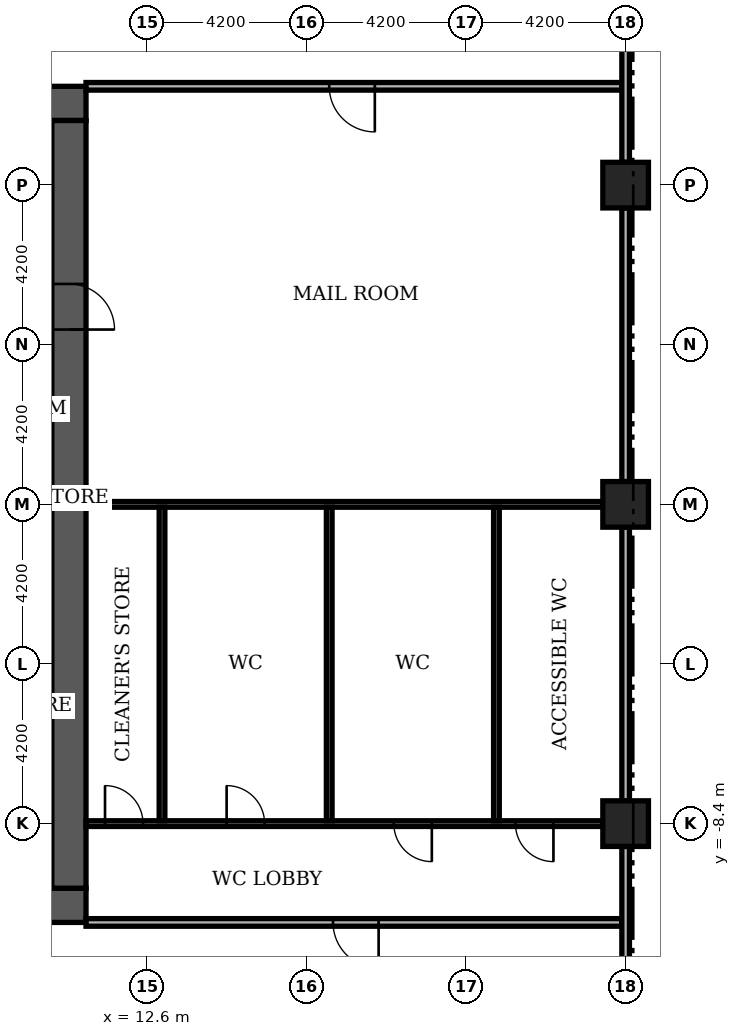
"""IFC4 building model, lengths in metres.
Left out: names, types, materials, properties, quantities, classifications, styles, units other than length and angle.
Written with IfcOpenShell. Run it as: python <this file> out.ifc"""

import sys

from ifc_helpers import new_model, si_unit, direction, frame, frame_2d, origin, origin_2d, place, context, subcontext, project, spatial, rectangle, extrude, element, fill, save


model = new_model("IFC4")
c1 = context("Model", 3, precision=1e-05, world=origin(), true_north=direction((0.0, 1.0)))
c2 = subcontext(c1, "Body", "Model", "MODEL_VIEW")
j1 = project(units=[si_unit("LENGTHUNIT", "METRE"), si_unit("PLANEANGLEUNIT", "RADIAN")], contexts=[c1])
p1 = place(None, origin())
s1 = spatial("IfcSite", under=j1, at=p1, CompositionType="ELEMENT")
p2 = place(p1, origin())
s2 = spatial("IfcBuilding", under=s1, at=p2, CompositionType="ELEMENT")
p3 = place(p2, origin())
s3 = spatial("IfcBuildingStorey", under=s2, at=p3, CompositionType="ELEMENT", Elevation=0.0)
for number, where, z_axis, x_axis in (
    (1, (9.2, -3.0, 0.0), (0.0, 0.0, 1.0), (1.0, 0.0, 0.0)),
    (2, (9.2, 2.1, 0.0), (0.0, 0.0, 1.0), (1.0, 0.0, 0.0)),
):
    element("IfcWall", number, at=place(p3, frame(where, z_axis=z_axis, x_axis=x_axis)), inside=s3, PredefinedType="SHEAR", context=c2, shape_type="SweptSolid", body=[
        extrude(rectangle(XDim=0.9, YDim=0.2, at=frame_2d((0.45, 0.0))), origin(), (0.0, 0.0, 1.0), 6.78),
    ])
p4 = place(p3, frame((-11.0, -10.55, 0.0), z_axis=(0.0, 0.0, 1.0), x_axis=(1.0, 0.0, 0.0)))
e3 = element("IfcWall", 3, at=p4, inside=s3, PredefinedType="SHEAR", context=c2, shape_type="SweptSolid", body=[
    extrude(rectangle(XDim=22.0, YDim=0.9, at=frame_2d((11.0, 0.0))), origin(), (0.0, 0.0, 1.0), 6.78),
])
p5 = place(p4, frame((7.4, 0.0, 0.0)))
e4 = element("IfcOpeningElement", 4, at=p5, cuts=e3, PredefinedType="OPENING", context=c2, shape_type="SweptSolid", body=[
    extrude(rectangle(XDim=1.8, YDim=2.2, at=frame_2d((0.9, 1.1))), frame((0.0, 0.46, 0.0), z_axis=(0.0, -1.0, 0.0), x_axis=(1.0, 0.0, 0.0)), (0.0, 0.0, 1.0), 0.92),
])
p6 = place(p3, frame((-11.0, 10.55, 0.0), z_axis=(0.0, 0.0, 1.0), x_axis=(1.0, 0.0, 0.0)))
e5 = element("IfcWall", 5, at=p6, inside=s3, PredefinedType="SHEAR", context=c2, shape_type="SweptSolid", body=[
    extrude(rectangle(XDim=22.0, YDim=0.9, at=frame_2d((11.0, 0.0))), origin(), (0.0, 0.0, 1.0), 6.78),
])
p7 = place(p6, frame((12.6, 0.0, 0.0)))
e6 = element("IfcOpeningElement", 6, at=p7, cuts=e5, PredefinedType="OPENING", context=c2, shape_type="SweptSolid", body=[
    extrude(rectangle(XDim=1.2, YDim=2.2, at=frame_2d((0.6, 1.1))), frame((0.0, 0.46, 0.0), z_axis=(0.0, -1.0, 0.0), x_axis=(1.0, 0.0, 0.0)), (0.0, 0.0, 1.0), 0.92),
])
p8 = place(p6, frame((14.8, 0.0, 0.0)))
e7 = element("IfcOpeningElement", 7, at=p8, cuts=e5, PredefinedType="OPENING", context=c2, shape_type="SweptSolid", body=[
    extrude(rectangle(XDim=1.2, YDim=2.2, at=frame_2d((0.6, 1.1))), frame((0.0, 0.46, 0.0), z_axis=(0.0, -1.0, 0.0), x_axis=(1.0, 0.0, 0.0)), (0.0, 0.0, 1.0), 0.92),
])
p9 = place(p3, frame((10.55, -10.1, 0.0), z_axis=(0.0, 0.0, 1.0), x_axis=(0.0, 1.0, 0.0)))
e8 = element("IfcWall", 8, at=p9, inside=s3, PredefinedType="SHEAR", context=c2, shape_type="SweptSolid", body=[
    extrude(rectangle(XDim=20.2, YDim=0.9, at=frame_2d((10.1, 0.0))), origin(), (0.0, 0.0, 1.0), 6.78),
])
p10 = place(p9, frame((14.7, 0.0, 0.0)))
e9 = element("IfcOpeningElement", 9, at=p10, cuts=e8, PredefinedType="OPENING", context=c2, shape_type="SweptSolid", body=[
    extrude(rectangle(XDim=1.2, YDim=2.2, at=frame_2d((0.6, 1.1))), frame((0.0, 0.46, 0.0), z_axis=(0.0, -1.0, 0.0), x_axis=(1.0, 0.0, 0.0)), (0.0, 0.0, 1.0), 0.92),
])
for number, where, z_axis, x_axis in (
    (10, (25.2, 0.0, 0.0), (0.0, 0.0, 1.0), (1.0, 0.0, 0.0)),
    (11, (25.2, 8.4, 0.0), (0.0, 0.0, 1.0), (1.0, 0.0, 0.0)),
    (12, (25.2, -8.4, 0.0), (0.0, 0.0, 1.0), (1.0, 0.0, 0.0)),
):
    element("IfcColumn", number, at=place(p3, frame(where, z_axis=z_axis, x_axis=x_axis)), inside=s3, PredefinedType="COLUMN", context=c2, shape_type="SweptSolid", body=[
        extrude(rectangle(XDim=1.2, YDim=1.2, at=origin_2d()), origin(), (0.0, 0.0, 1.0), 7.2),
    ])
p11 = place(p3, frame((11.0, -11.0, 0.0), z_axis=(0.0, 0.0, 1.0), x_axis=(1.0, 0.0, 0.0)))
e13 = element("IfcWall", 13, at=p11, inside=s3, PredefinedType="PARTITIONING", context=c2, shape_type="SweptSolid", body=[
    extrude(rectangle(XDim=14.1, YDim=0.2, at=frame_2d((7.05, 0.0))), origin(), (0.0, 0.0, 1.0), 6.78),
])
p12 = place(p11, frame((6.5, 0.0, 0.0)))
e14 = element("IfcOpeningElement", 14, at=p12, cuts=e13, PredefinedType="OPENING", context=c2, shape_type="SweptSolid", body=[
    extrude(rectangle(XDim=1.2, YDim=2.2, at=frame_2d((0.6, 1.1))), frame((0.0, 0.11, 0.0), z_axis=(0.0, -1.0, 0.0), x_axis=(1.0, 0.0, 0.0)), (0.0, 0.0, 1.0), 0.22),
])
p13 = place(p3, frame((11.0, -8.4, 0.0), z_axis=(0.0, 0.0, 1.0), x_axis=(1.0, 0.0, 0.0)))
e15 = element("IfcWall", 15, at=p13, inside=s3, PredefinedType="PARTITIONING", context=c2, shape_type="SweptSolid", body=[
    extrude(rectangle(XDim=13.6, YDim=0.15, at=frame_2d((6.8, 0.0))), origin(), (0.0, 0.0, 1.0), 6.78),
])
p14 = place(p13, frame((0.5, 0.0, 0.0)))
e16 = element("IfcOpeningElement", 16, at=p14, cuts=e15, PredefinedType="OPENING", context=c2, shape_type="SweptSolid", body=[
    extrude(rectangle(XDim=1.0, YDim=2.1, at=frame_2d((0.5, 1.05))), frame((0.0, 0.085, 0.0), z_axis=(0.0, -1.0, 0.0), x_axis=(1.0, 0.0, 0.0)), (0.0, 0.0, 1.0), 0.17),
])
p15 = place(p13, frame((3.7, 0.0, 0.0)))
e17 = element("IfcOpeningElement", 17, at=p15, cuts=e15, PredefinedType="OPENING", context=c2, shape_type="SweptSolid", body=[
    extrude(rectangle(XDim=1.0, YDim=2.1, at=frame_2d((0.5, 1.05))), frame((0.0, 0.085, 0.0), z_axis=(0.0, -1.0, 0.0), x_axis=(1.0, 0.0, 0.0)), (0.0, 0.0, 1.0), 0.17),
])
p16 = place(p13, frame((8.1, 0.0, 0.0)))
e18 = element("IfcOpeningElement", 18, at=p16, cuts=e15, PredefinedType="OPENING", context=c2, shape_type="SweptSolid", body=[
    extrude(rectangle(XDim=1.0, YDim=2.1, at=frame_2d((0.5, 1.05))), frame((0.0, 0.085, 0.0), z_axis=(0.0, -1.0, 0.0), x_axis=(1.0, 0.0, 0.0)), (0.0, 0.0, 1.0), 0.17),
])
p17 = place(p13, frame((11.3, 0.0, 0.0)))
e19 = element("IfcOpeningElement", 19, at=p17, cuts=e15, PredefinedType="OPENING", context=c2, shape_type="SweptSolid", body=[
    extrude(rectangle(XDim=1.0, YDim=2.1, at=frame_2d((0.5, 1.05))), frame((0.0, 0.085, 0.0), z_axis=(0.0, -1.0, 0.0), x_axis=(1.0, 0.0, 0.0)), (0.0, 0.0, 1.0), 0.17),
])
p18 = place(p3, frame((11.0, 0.0, 0.0), z_axis=(0.0, 0.0, 1.0), x_axis=(1.0, 0.0, 0.0)))
e20 = element("IfcWall", 20, at=p18, inside=s3, PredefinedType="PARTITIONING", context=c2, shape_type="SweptSolid", body=[
    extrude(rectangle(XDim=13.6, YDim=0.15, at=frame_2d((6.8, 0.0))), origin(), (0.0, 0.0, 1.0), 6.78),
])
p19 = place(p3, frame((11.0, 11.0, 0.0), z_axis=(0.0, 0.0, 1.0), x_axis=(1.0, 0.0, 0.0)))
e21 = element("IfcWall", 21, at=p19, inside=s3, PredefinedType="PARTITIONING", context=c2, shape_type="SweptSolid", body=[
    extrude(rectangle(XDim=14.1, YDim=0.2, at=frame_2d((7.05, 0.0))), origin(), (0.0, 0.0, 1.0), 6.78),
])
p20 = place(p19, frame((6.4, 0.0, 0.0)))
e22 = element("IfcOpeningElement", 22, at=p20, cuts=e21, PredefinedType="OPENING", context=c2, shape_type="SweptSolid", body=[
    extrude(rectangle(XDim=1.2, YDim=2.2, at=frame_2d((0.6, 1.1))), frame((0.0, 0.11, 0.0), z_axis=(0.0, -1.0, 0.0), x_axis=(1.0, 0.0, 0.0)), (0.0, 0.0, 1.0), 0.22),
])
for number, where, z_axis, x_axis in (
    (23, (13.0, -8.325, 0.0), (0.0, 0.0, 1.0), (0.0, 1.0, 0.0)),
    (24, (17.4, -8.325, 0.0), (0.0, 0.0, 1.0), (0.0, 1.0, 0.0)),
    (25, (21.8, -8.325, 0.0), (0.0, 0.0, 1.0), (0.0, 1.0, 0.0)),
):
    element("IfcWall", number, at=place(p3, frame(where, z_axis=z_axis, x_axis=x_axis)), inside=s3, PredefinedType="PARTITIONING", context=c2, shape_type="SweptSolid", body=[
        extrude(rectangle(XDim=8.25, YDim=0.15, at=frame_2d((4.125, 0.0))), origin(), (0.0, 0.0, 1.0), 6.78),
    ])
p21 = place(p3, frame((25.2, -16.2, 0.0), z_axis=(0.0, 0.0, 1.0), x_axis=(0.0, 1.0, 0.0)))
e26 = element("IfcWall", 26, at=p21, inside=s3, PredefinedType="PARTITIONING", context=c2, shape_type="SweptSolid", body=[
    extrude(rectangle(XDim=7.2, YDim=0.2, at=frame_2d((3.6, 0.0))), origin(), (0.0, 0.0, 1.0), 6.48),
])
p22 = place(p21, frame((1.5, 0.0, 0.0)))
e27 = element("IfcOpeningElement", 27, at=p22, cuts=e26, PredefinedType="OPENING", context=c2, shape_type="SweptSolid", body=[
    extrude(rectangle(XDim=1.8, YDim=2.2, at=frame_2d((0.9, 1.1))), frame((0.0, 0.11, 0.0), z_axis=(0.0, -1.0, 0.0), x_axis=(1.0, 0.0, 0.0)), (0.0, 0.0, 1.0), 0.22),
])
for number, where, z_axis, x_axis in (
    (28, (25.2, -7.8, 0.0), (0.0, 0.0, 1.0), (0.0, 1.0, 0.0)),
    (29, (25.2, 0.6, 0.0), (0.0, 0.0, 1.0), (0.0, 1.0, 0.0)),
):
    element("IfcWall", number, at=place(p3, frame(where, z_axis=z_axis, x_axis=x_axis)), inside=s3, PredefinedType="PARTITIONING", context=c2, shape_type="SweptSolid", body=[
        extrude(rectangle(XDim=7.2, YDim=0.2, at=frame_2d((3.6, 0.0))), origin(), (0.0, 0.0, 1.0), 6.48),
    ])
p23 = place(p3, frame((25.2, 9.0, 0.0), z_axis=(0.0, 0.0, 1.0), x_axis=(0.0, 1.0, 0.0)))
e30 = element("IfcWall", 30, at=p23, inside=s3, PredefinedType="PARTITIONING", context=c2, shape_type="SweptSolid", body=[
    extrude(rectangle(XDim=7.2, YDim=0.2, at=frame_2d((3.6, 0.0))), origin(), (0.0, 0.0, 1.0), 6.48),
])
p24 = place(p23, frame((3.9, 0.0, 0.0)))
e31 = element("IfcOpeningElement", 31, at=p24, cuts=e30, PredefinedType="OPENING", context=c2, shape_type="SweptSolid", body=[
    extrude(rectangle(XDim=1.8, YDim=2.2, at=frame_2d((0.9, 1.1))), frame((0.0, 0.11, 0.0), z_axis=(0.0, -1.0, 0.0), x_axis=(1.0, 0.0, 0.0)), (0.0, 0.0, 1.0), 0.22),
])
p25 = place(p10, frame((1.2, 0.0, 0.0), z_axis=(0.0, 0.0, 1.0), x_axis=(-1.0, 0.0, 0.0)))
e32 = element("IfcDoor", 32, at=p25, inside=s3, OperationType="SINGLE_SWING_LEFT", PredefinedType="DOOR", context=c2, shape_type="SweptSolid", body=[
    extrude(rectangle(XDim=1.2, YDim=2.2, at=frame_2d((0.6, 1.1))), frame((0.0, 0.025, 0.0), z_axis=(0.0, -1.0, 0.0), x_axis=(1.0, 0.0, 0.0)), (0.0, 0.0, 1.0), 0.05),
])
fill(e9, e32)
p26 = place(p12, origin())
e33 = element("IfcDoor", 33, at=p26, inside=s3, OperationType="SINGLE_SWING_RIGHT", PredefinedType="DOOR", context=c2, shape_type="SweptSolid", body=[
    extrude(rectangle(XDim=1.2, YDim=2.2, at=frame_2d((0.6, 1.1))), frame((0.0, 0.025, 0.0), z_axis=(0.0, -1.0, 0.0), x_axis=(1.0, 0.0, 0.0)), (0.0, 0.0, 1.0), 0.05),
])
fill(e14, e33)
p27 = place(p14, origin())
e34 = element("IfcDoor", 34, at=p27, inside=s3, OperationType="SINGLE_SWING_LEFT", PredefinedType="DOOR", context=c2, shape_type="SweptSolid", body=[
    extrude(rectangle(XDim=1.0, YDim=2.1, at=frame_2d((0.5, 1.05))), frame((0.0, 0.025, 0.0), z_axis=(0.0, -1.0, 0.0), x_axis=(1.0, 0.0, 0.0)), (0.0, 0.0, 1.0), 0.05),
])
fill(e16, e34)
p28 = place(p15, origin())
e35 = element("IfcDoor", 35, at=p28, inside=s3, OperationType="SINGLE_SWING_LEFT", PredefinedType="DOOR", context=c2, shape_type="SweptSolid", body=[
    extrude(rectangle(XDim=1.0, YDim=2.1, at=frame_2d((0.5, 1.05))), frame((0.0, 0.025, 0.0), z_axis=(0.0, -1.0, 0.0), x_axis=(1.0, 0.0, 0.0)), (0.0, 0.0, 1.0), 0.05),
])
fill(e17, e35)
p29 = place(p16, origin())
e36 = element("IfcDoor", 36, at=p29, inside=s3, OperationType="SINGLE_SWING_RIGHT", PredefinedType="DOOR", context=c2, shape_type="SweptSolid", body=[
    extrude(rectangle(XDim=1.0, YDim=2.1, at=frame_2d((0.5, 1.05))), frame((0.0, 0.025, 0.0), z_axis=(0.0, -1.0, 0.0), x_axis=(1.0, 0.0, 0.0)), (0.0, 0.0, 1.0), 0.05),
])
fill(e18, e36)
p30 = place(p17, origin())
e37 = element("IfcDoor", 37, at=p30, inside=s3, OperationType="SINGLE_SWING_RIGHT", PredefinedType="DOOR", context=c2, shape_type="SweptSolid", body=[
    extrude(rectangle(XDim=1.0, YDim=2.1, at=frame_2d((0.5, 1.05))), frame((0.0, 0.025, 0.0), z_axis=(0.0, -1.0, 0.0), x_axis=(1.0, 0.0, 0.0)), (0.0, 0.0, 1.0), 0.05),
])
fill(e19, e37)
p31 = place(p20, origin())
e38 = element("IfcDoor", 38, at=p31, inside=s3, OperationType="SINGLE_SWING_RIGHT", PredefinedType="DOOR", context=c2, shape_type="SweptSolid", body=[
    extrude(rectangle(XDim=1.2, YDim=2.2, at=frame_2d((0.6, 1.1))), frame((0.0, 0.025, 0.0), z_axis=(0.0, -1.0, 0.0), x_axis=(1.0, 0.0, 0.0)), (0.0, 0.0, 1.0), 0.05),
])
fill(e22, e38)
save(model, sys.argv[1])
